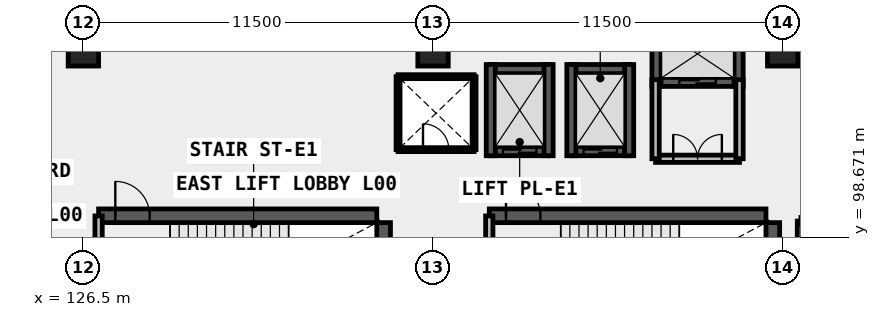
"""IFC4 building model, lengths in metres.
Left out: names, types, materials, properties, quantities, classifications, styles, units other than length and angle.
Written with IfcOpenShell. Run it as: python <this file> out.ifc"""

import sys

from ifc_helpers import new_model, si_unit, direction, frame, frame_2d, origin, origin_2d, place, context, subcontext, project, spatial, rectangle, extrude, element, fill, save


model = new_model("IFC4")
c1 = context("Model", 3, precision=1e-05, world=origin(), true_north=direction((0.0, 1.0)))
c2 = subcontext(c1, "Body", "Model", "MODEL_VIEW")
j1 = project(units=[si_unit("LENGTHUNIT", "METRE"), si_unit("PLANEANGLEUNIT", "RADIAN")], contexts=[c1])
p1 = place(None, origin())
s1 = spatial("IfcSite", under=j1, at=p1, CompositionType="ELEMENT")
p2 = place(p1, origin())
s2 = spatial("IfcBuilding", under=s1, at=p2, CompositionType="ELEMENT")
p3 = place(p2, origin())
s3 = spatial("IfcBuildingStorey", under=s2, at=p3, CompositionType="ELEMENT", Elevation=0.0)
for number, where, z_axis, x_axis in (
    (1, (126.5, 104.8, 0.0), (0.0, 0.0, 1.0), (1.0, 0.0, 0.0)),
    (2, (138.0, 104.8, 0.0), (0.0, 0.0, 1.0), (1.0, 0.0, 0.0)),
    (3, (149.5, 104.8, 0.0), (0.0, 0.0, 1.0), (1.0, 0.0, 0.0)),
):
    element("IfcColumn", number, at=place(p3, frame(where, z_axis=z_axis, x_axis=x_axis)), inside=s3, PredefinedType="COLUMN", context=c2, shape_type="SweptSolid", body=[
        extrude(rectangle(XDim=1.0, YDim=1.0, at=origin_2d()), origin(), (0.0, 0.0, 1.0), 4.2),
    ])
p4 = place(p3, frame((145.35, 103.78, 0.0), z_axis=(0.0, 0.0, 1.0), x_axis=(1.0, 0.0, 0.0)))
e4 = element("IfcWall", 4, at=p4, inside=s3, PredefinedType="SHEAR", context=c2, shape_type="SweptSolid", body=[
    extrude(rectangle(XDim=2.7, YDim=0.3, at=frame_2d((1.35, 0.0))), origin(), (0.0, 0.0, 1.0), 4.2),
])
p5 = place(p4, frame((0.75, 0.0, 0.0)))
e5 = element("IfcOpeningElement", 5, at=p5, cuts=e4, PredefinedType="OPENING", context=c2, shape_type="SweptSolid", body=[
    extrude(rectangle(XDim=1.2, YDim=2.15, at=frame_2d((0.6, 1.075))), frame((0.0, 0.16, 0.0), z_axis=(0.0, -1.0, 0.0), x_axis=(1.0, 0.0, 0.0)), (0.0, 0.0, 1.0), 0.32),
])
for number, where, z_axis, x_axis in (
    (6, (145.35, 103.63, 0.0), (0.0, 0.0, 1.0), (0.0, 1.0, 0.0)),
    (7, (148.05, 103.63, 0.0), (0.0, 0.0, 1.0), (0.0, 1.0, 0.0)),
):
    element("IfcWall", number, at=place(p3, frame(where, z_axis=z_axis, x_axis=x_axis)), inside=s3, PredefinedType="SHEAR", context=c2, shape_type="SweptSolid", body=[
        extrude(rectangle(XDim=2.14, YDim=0.3, at=frame_2d((1.07, 0.0))), origin(), (0.0, 0.0, 1.0), 4.2),
    ])
p6 = place(p3, frame((139.9, 101.5, 0.0), z_axis=(0.0, 0.0, 1.0), x_axis=(1.0, 0.0, 0.0)))
e8 = element("IfcWall", 8, at=p6, inside=s3, PredefinedType="SHEAR", context=c2, shape_type="SweptSolid", body=[
    extrude(rectangle(XDim=1.9, YDim=0.3, at=frame_2d((0.95, 0.0))), origin(), (0.0, 0.0, 1.0), 4.2),
])
p7 = place(p6, frame((0.4, 0.0, 0.0)))
e9 = element("IfcOpeningElement", 9, at=p7, cuts=e8, PredefinedType="OPENING", context=c2, shape_type="SweptSolid", body=[
    extrude(rectangle(XDim=1.1, YDim=2.15, at=frame_2d((0.55, 1.075))), frame((0.0, 0.16, 0.0), z_axis=(0.0, -1.0, 0.0), x_axis=(1.0, 0.0, 0.0)), (0.0, 0.0, 1.0), 0.32),
])
p8 = place(p3, frame((139.9, 104.2, 0.0), z_axis=(0.0, 0.0, 1.0), x_axis=(1.0, 0.0, 0.0)))
e10 = element("IfcWall", 10, at=p8, inside=s3, PredefinedType="SHEAR", context=c2, shape_type="SweptSolid", body=[
    extrude(rectangle(XDim=1.9, YDim=0.3, at=frame_2d((0.95, 0.0))), origin(), (0.0, 0.0, 1.0), 4.2),
])
for number, where, z_axis, x_axis in (
    (11, (139.9, 101.35, 0.0), (0.0, 0.0, 1.0), (0.0, 1.0, 0.0)),
    (12, (141.8, 101.35, 0.0), (0.0, 0.0, 1.0), (0.0, 1.0, 0.0)),
):
    element("IfcWall", number, at=place(p3, frame(where, z_axis=z_axis, x_axis=x_axis)), inside=s3, PredefinedType="SHEAR", context=c2, shape_type="SweptSolid", body=[
        extrude(rectangle(XDim=3.0, YDim=0.3, at=frame_2d((1.5, 0.0))), origin(), (0.0, 0.0, 1.0), 4.2),
    ])
p9 = place(p3, frame((142.55, 101.5, 0.0), z_axis=(0.0, 0.0, 1.0), x_axis=(1.0, 0.0, 0.0)))
e13 = element("IfcWall", 13, at=p9, inside=s3, PredefinedType="SHEAR", context=c2, shape_type="SweptSolid", body=[
    extrude(rectangle(XDim=1.9, YDim=0.3, at=frame_2d((0.95, 0.0))), origin(), (0.0, 0.0, 1.0), 4.2),
])
p10 = place(p9, frame((0.4, 0.0, 0.0)))
e14 = element("IfcOpeningElement", 14, at=p10, cuts=e13, PredefinedType="OPENING", context=c2, shape_type="SweptSolid", body=[
    extrude(rectangle(XDim=1.1, YDim=2.15, at=frame_2d((0.55, 1.075))), frame((0.0, 0.16, 0.0), z_axis=(0.0, -1.0, 0.0), x_axis=(1.0, 0.0, 0.0)), (0.0, 0.0, 1.0), 0.32),
])
p11 = place(p3, frame((142.55, 104.2, 0.0), z_axis=(0.0, 0.0, 1.0), x_axis=(1.0, 0.0, 0.0)))
e15 = element("IfcWall", 15, at=p11, inside=s3, PredefinedType="SHEAR", context=c2, shape_type="SweptSolid", body=[
    extrude(rectangle(XDim=1.9, YDim=0.3, at=frame_2d((0.95, 0.0))), origin(), (0.0, 0.0, 1.0), 4.2),
])
for number, where, z_axis, x_axis in (
    (16, (142.55, 101.35, 0.0), (0.0, 0.0, 1.0), (0.0, 1.0, 0.0)),
    (17, (144.45, 101.35, 0.0), (0.0, 0.0, 1.0), (0.0, 1.0, 0.0)),
):
    element("IfcWall", number, at=place(p3, frame(where, z_axis=z_axis, x_axis=x_axis)), inside=s3, PredefinedType="SHEAR", context=c2, shape_type="SweptSolid", body=[
        extrude(rectangle(XDim=3.0, YDim=0.3, at=frame_2d((1.5, 0.0))), origin(), (0.0, 0.0, 1.0), 4.2),
    ])
p12 = place(p3, frame((127.0, 99.375, 0.0), z_axis=(0.0, 0.0, 1.0), x_axis=(1.0, 0.0, 0.0)))
e18 = element("IfcWall", 18, at=p12, inside=s3, PredefinedType="SHEAR", context=c2, shape_type="SweptSolid", body=[
    extrude(rectangle(XDim=9.15, YDim=0.45, at=frame_2d((4.575, 0.0))), origin(), (0.0, 0.0, 1.0), 4.2),
])
p13 = place(p12, frame((0.55, 0.0, 0.0)))
e19 = element("IfcOpeningElement", 19, at=p13, cuts=e18, PredefinedType="OPENING", context=c2, shape_type="SweptSolid", body=[
    extrude(rectangle(XDim=1.13, YDim=2.15, at=frame_2d((0.565, 1.075))), frame((0.0, 0.235, 0.0), z_axis=(0.0, -1.0, 0.0), x_axis=(1.0, 0.0, 0.0)), (0.0, 0.0, 1.0), 0.47),
])
p14 = place(p3, frame((136.375, 95.55, 0.0), z_axis=(0.0, 0.0, 1.0), x_axis=(0.0, 1.0, 0.0)))
e20 = element("IfcWall", 20, at=p14, inside=s3, PredefinedType="SHEAR", context=c2, shape_type="SweptSolid", body=[
    extrude(rectangle(XDim=3.6, YDim=0.45, at=frame_2d((1.8, 0.0))), origin(), (0.0, 0.0, 1.0), 4.2),
])
p15 = place(p3, frame((139.85, 99.375, 0.0), z_axis=(0.0, 0.0, 1.0), x_axis=(1.0, 0.0, 0.0)))
e21 = element("IfcWall", 21, at=p15, inside=s3, PredefinedType="SHEAR", context=c2, shape_type="SweptSolid", body=[
    extrude(rectangle(XDim=9.1, YDim=0.45, at=frame_2d((4.55, 0.0))), origin(), (0.0, 0.0, 1.0), 4.2),
])
p16 = place(p15, frame((0.55, 0.0, 0.0)))
e22 = element("IfcOpeningElement", 22, at=p16, cuts=e21, PredefinedType="OPENING", context=c2, shape_type="SweptSolid", body=[
    extrude(rectangle(XDim=1.13, YDim=2.15, at=frame_2d((0.565, 1.075))), frame((0.0, 0.235, 0.0), z_axis=(0.0, -1.0, 0.0), x_axis=(1.0, 0.0, 0.0)), (0.0, 0.0, 1.0), 0.47),
])
p17 = place(p3, frame((149.175, 95.32, 0.0), z_axis=(0.0, 0.0, 1.0), x_axis=(0.0, 1.0, 0.0)))
e23 = element("IfcWall", 23, at=p17, inside=s3, PredefinedType="SHEAR", context=c2, shape_type="SweptSolid", body=[
    extrude(rectangle(XDim=3.83, YDim=0.45, at=frame_2d((1.915, 0.0))), origin(), (0.0, 0.0, 1.0), 4.2),
])
p18 = place(p3, frame((150.02, 104.8, 0.0), z_axis=(0.0, 0.0, 1.0), x_axis=(1.0, 0.0, 0.0)))
e24 = element("IfcWall", 24, at=p18, inside=s3, PredefinedType="SOLIDWALL", context=c2, shape_type="SweptSolid", body=[
    extrude(rectangle(XDim=10.46, YDim=0.28, at=frame_2d((5.23, 0.0))), origin(), (0.0, 0.0, 1.0), 3.15),
])
p19 = place(p18, frame((4.23, 0.0, 0.0)))
e25 = element("IfcOpeningElement", 25, at=p19, cuts=e24, PredefinedType="OPENING", context=c2, shape_type="SweptSolid", body=[
    extrude(rectangle(XDim=2.0, YDim=2.4, at=frame_2d((1.0, 1.2))), frame((0.0, 0.15, 0.0), z_axis=(0.0, -1.0, 0.0), x_axis=(1.0, 0.0, 0.0)), (0.0, 0.0, 1.0), 0.3),
])
p20 = place(p18, frame((0.99, 0.0, 0.78)))
e26 = element("IfcOpeningElement", 26, at=p20, cuts=e24, PredefinedType="OPENING", context=c2, shape_type="SweptSolid", body=[
    extrude(rectangle(XDim=2.25, YDim=2.05, at=frame_2d((1.125, 1.025))), frame((0.0, 0.15, 0.0), z_axis=(0.0, -1.0, 0.0), x_axis=(1.0, 0.0, 0.0)), (0.0, 0.0, 1.0), 0.3),
])
p21 = place(p3, frame((127.0, 95.33, 0.0), z_axis=(0.0, 0.0, 1.0), x_axis=(0.0, 1.0, 0.0)))
e27 = element("IfcWall", 27, at=p21, inside=s3, PredefinedType="SOLIDWALL", context=c2, shape_type="SweptSolid", body=[
    extrude(rectangle(XDim=4.04, YDim=0.24, at=frame_2d((2.02, 0.0))), origin(), (0.0, 0.0, 1.0), 3.88),
])
p22 = place(p21, frame((1.45, 0.0, 0.0)))
e28 = element("IfcOpeningElement", 28, at=p22, cuts=e27, PredefinedType="OPENING", context=c2, shape_type="SweptSolid", body=[
    extrude(rectangle(XDim=1.13, YDim=2.15, at=frame_2d((0.565, 1.075))), frame((0.0, 0.13, 0.0), z_axis=(0.0, -1.0, 0.0), x_axis=(1.0, 0.0, 0.0)), (0.0, 0.0, 1.0), 0.26),
])
p23 = place(p3, frame((139.85, 95.33, 0.0), z_axis=(0.0, 0.0, 1.0), x_axis=(0.0, 1.0, 0.0)))
e29 = element("IfcWall", 29, at=p23, inside=s3, PredefinedType="SOLIDWALL", context=c2, shape_type="SweptSolid", body=[
    extrude(rectangle(XDim=4.04, YDim=0.24, at=frame_2d((2.02, 0.0))), origin(), (0.0, 0.0, 1.0), 3.88),
])
p24 = place(p23, frame((1.45, 0.0, 0.0)))
e30 = element("IfcOpeningElement", 30, at=p24, cuts=e29, PredefinedType="OPENING", context=c2, shape_type="SweptSolid", body=[
    extrude(rectangle(XDim=1.13, YDim=2.15, at=frame_2d((0.565, 1.075))), frame((0.0, 0.13, 0.0), z_axis=(0.0, -1.0, 0.0), x_axis=(1.0, 0.0, 0.0)), (0.0, 0.0, 1.0), 0.26),
])
p25 = place(p3, frame((145.32, 101.25, 0.0), z_axis=(0.0, 0.0, 1.0), x_axis=(1.0, 0.0, 0.0)))
e31 = element("IfcWall", 31, at=p25, inside=s3, PredefinedType="SOLIDWALL", context=c2, shape_type="SweptSolid", body=[
    extrude(rectangle(XDim=2.76, YDim=0.24, at=frame_2d((1.38, 0.0))), origin(), (0.0, 0.0, 1.0), 3.88),
])
p26 = place(p25, frame((0.58, 0.0, 0.0)))
e32 = element("IfcOpeningElement", 32, at=p26, cuts=e31, PredefinedType="OPENING", context=c2, shape_type="SweptSolid", body=[
    extrude(rectangle(XDim=1.6, YDim=2.15, at=frame_2d((0.8, 1.075))), frame((0.0, 0.13, 0.0), z_axis=(0.0, -1.0, 0.0), x_axis=(1.0, 0.0, 0.0)), (0.0, 0.0, 1.0), 0.26),
])
for number, where, z_axis, x_axis in (
    (33, (145.32, 101.25, 0.0), (0.0, 0.0, 1.0), (0.0, 1.0, 0.0)),
    (34, (148.08, 101.25, 0.0), (0.0, 0.0, 1.0), (0.0, 1.0, 0.0)),
):
    element("IfcWall", number, at=place(p3, frame(where, z_axis=z_axis, x_axis=x_axis)), inside=s3, PredefinedType="SOLIDWALL", context=c2, shape_type="SweptSolid", body=[
        extrude(rectangle(XDim=2.6, YDim=0.24, at=frame_2d((1.3, 0.0))), origin(), (0.0, 0.0, 1.0), 3.88),
    ])
p27 = place(p3, frame((136.85, 101.55, 0.0), z_axis=(0.0, 0.0, 1.0), x_axis=(1.0, 0.0, 0.0)))
e35 = element("IfcWall", 35, at=p27, inside=s3, PredefinedType="PLUMBINGWALL", context=c2, shape_type="SweptSolid", body=[
    extrude(rectangle(XDim=2.5, YDim=0.13, at=frame_2d((1.25, 0.0))), origin(), (0.0, 0.0, 1.0), 3.88),
])
p28 = place(p27, frame((0.82, 0.0, 0.0)))
e36 = element("IfcOpeningElement", 36, at=p28, cuts=e35, PredefinedType="OPENING", context=c2, shape_type="SweptSolid", body=[
    extrude(rectangle(XDim=0.85, YDim=2.0, at=frame_2d((0.425, 1.0))), frame((0.0, 0.075, 0.0), z_axis=(0.0, -1.0, 0.0), x_axis=(1.0, 0.0, 0.0)), (0.0, 0.0, 1.0), 0.15),
])
for number, where, z_axis, x_axis in (
    (37, (136.85, 101.55, 0.0), (0.0, 0.0, 1.0), (0.0, 1.0, 0.0)),
    (38, (139.35, 101.55, 0.0), (0.0, 0.0, 1.0), (0.0, 1.0, 0.0)),
):
    element("IfcWall", number, at=place(p3, frame(where, z_axis=z_axis, x_axis=x_axis)), inside=s3, PredefinedType="PLUMBINGWALL", context=c2, shape_type="SweptSolid", body=[
        extrude(rectangle(XDim=2.4, YDim=0.13, at=frame_2d((1.2, 0.0))), origin(), (0.0, 0.0, 1.0), 3.88),
    ])
p29 = place(p3, frame((136.85, 103.95, 0.0), z_axis=(0.0, 0.0, 1.0), x_axis=(1.0, 0.0, 0.0)))
e39 = element("IfcWall", 39, at=p29, inside=s3, PredefinedType="PLUMBINGWALL", context=c2, shape_type="SweptSolid", body=[
    extrude(rectangle(XDim=2.5, YDim=0.13, at=frame_2d((1.25, 0.0))), origin(), (0.0, 0.0, 1.0), 3.88),
])
p30 = place(p3, frame((150.1, 95.4, 0.0), z_axis=(0.0, 0.0, 1.0), x_axis=(0.0, 1.0, 0.0)))
e40 = element("IfcWall", 40, at=p30, inside=s3, PredefinedType="SOLIDWALL", context=c2, shape_type="SweptSolid", body=[
    extrude(rectangle(XDim=3.8, YDim=0.24, at=frame_2d((1.9, 0.0))), origin(), (0.0, 0.0, 1.0), 3.88),
])
p31 = place(p5, origin())
e41 = element("IfcDoor", 41, at=p31, inside=s3, OperationType="SLIDING_TO_RIGHT", PredefinedType="DOOR", context=c2, shape_type="SweptSolid", body=[
    extrude(rectangle(XDim=1.2, YDim=2.15, at=frame_2d((0.6, 1.075))), frame((0.0, 0.025, 0.0), z_axis=(0.0, -1.0, 0.0), x_axis=(1.0, 0.0, 0.0)), (0.0, 0.0, 1.0), 0.05),
])
fill(e5, e41)
p32 = place(p7, origin())
e42 = element("IfcDoor", 42, at=p32, inside=s3, OperationType="SLIDING_TO_LEFT", PredefinedType="DOOR", context=c2, shape_type="SweptSolid", body=[
    extrude(rectangle(XDim=1.1, YDim=2.15, at=frame_2d((0.55, 1.075))), frame((0.0, 0.025, 0.0), z_axis=(0.0, -1.0, 0.0), x_axis=(1.0, 0.0, 0.0)), (0.0, 0.0, 1.0), 0.05),
])
fill(e9, e42)
p33 = place(p10, origin())
e43 = element("IfcDoor", 43, at=p33, inside=s3, OperationType="SLIDING_TO_LEFT", PredefinedType="DOOR", context=c2, shape_type="SweptSolid", body=[
    extrude(rectangle(XDim=1.1, YDim=2.15, at=frame_2d((0.55, 1.075))), frame((0.0, 0.025, 0.0), z_axis=(0.0, -1.0, 0.0), x_axis=(1.0, 0.0, 0.0)), (0.0, 0.0, 1.0), 0.05),
])
fill(e14, e43)
p34 = place(p13, origin())
e44 = element("IfcDoor", 44, at=p34, inside=s3, OperationType="SINGLE_SWING_LEFT", PredefinedType="DOOR", context=c2, shape_type="SweptSolid", body=[
    extrude(rectangle(XDim=1.13, YDim=2.15, at=frame_2d((0.565, 1.075))), frame((0.0, 0.025, 0.0), z_axis=(0.0, -1.0, 0.0), x_axis=(1.0, 0.0, 0.0)), (0.0, 0.0, 1.0), 0.05),
])
fill(e19, e44)
p35 = place(p16, origin())
e45 = element("IfcDoor", 45, at=p35, inside=s3, OperationType="SINGLE_SWING_LEFT", PredefinedType="DOOR", context=c2, shape_type="SweptSolid", body=[
    extrude(rectangle(XDim=1.13, YDim=2.15, at=frame_2d((0.565, 1.075))), frame((0.0, 0.025, 0.0), z_axis=(0.0, -1.0, 0.0), x_axis=(1.0, 0.0, 0.0)), (0.0, 0.0, 1.0), 0.05),
])
fill(e22, e45)
p36 = place(p26, origin())
e46 = element("IfcDoor", 46, at=p36, inside=s3, OperationType="DOUBLE_DOOR_SINGLE_SWING", PredefinedType="DOOR", context=c2, shape_type="SweptSolid", body=[
    extrude(rectangle(XDim=1.6, YDim=2.15, at=frame_2d((0.8, 1.075))), frame((0.0, 0.025, 0.0), z_axis=(0.0, -1.0, 0.0), x_axis=(1.0, 0.0, 0.0)), (0.0, 0.0, 1.0), 0.05),
])
fill(e32, e46)
p37 = place(p28, origin())
e47 = element("IfcDoor", 47, at=p37, inside=s3, OperationType="SINGLE_SWING_LEFT", PredefinedType="TRAPDOOR", context=c2, shape_type="SweptSolid", body=[
    extrude(rectangle(XDim=0.85, YDim=2.0, at=frame_2d((0.425, 1.0))), frame((0.0, 0.025, 0.0), z_axis=(0.0, -1.0, 0.0), x_axis=(1.0, 0.0, 0.0)), (0.0, 0.0, 1.0), 0.05),
])
fill(e36, e47)
save(model, sys.argv[1])
